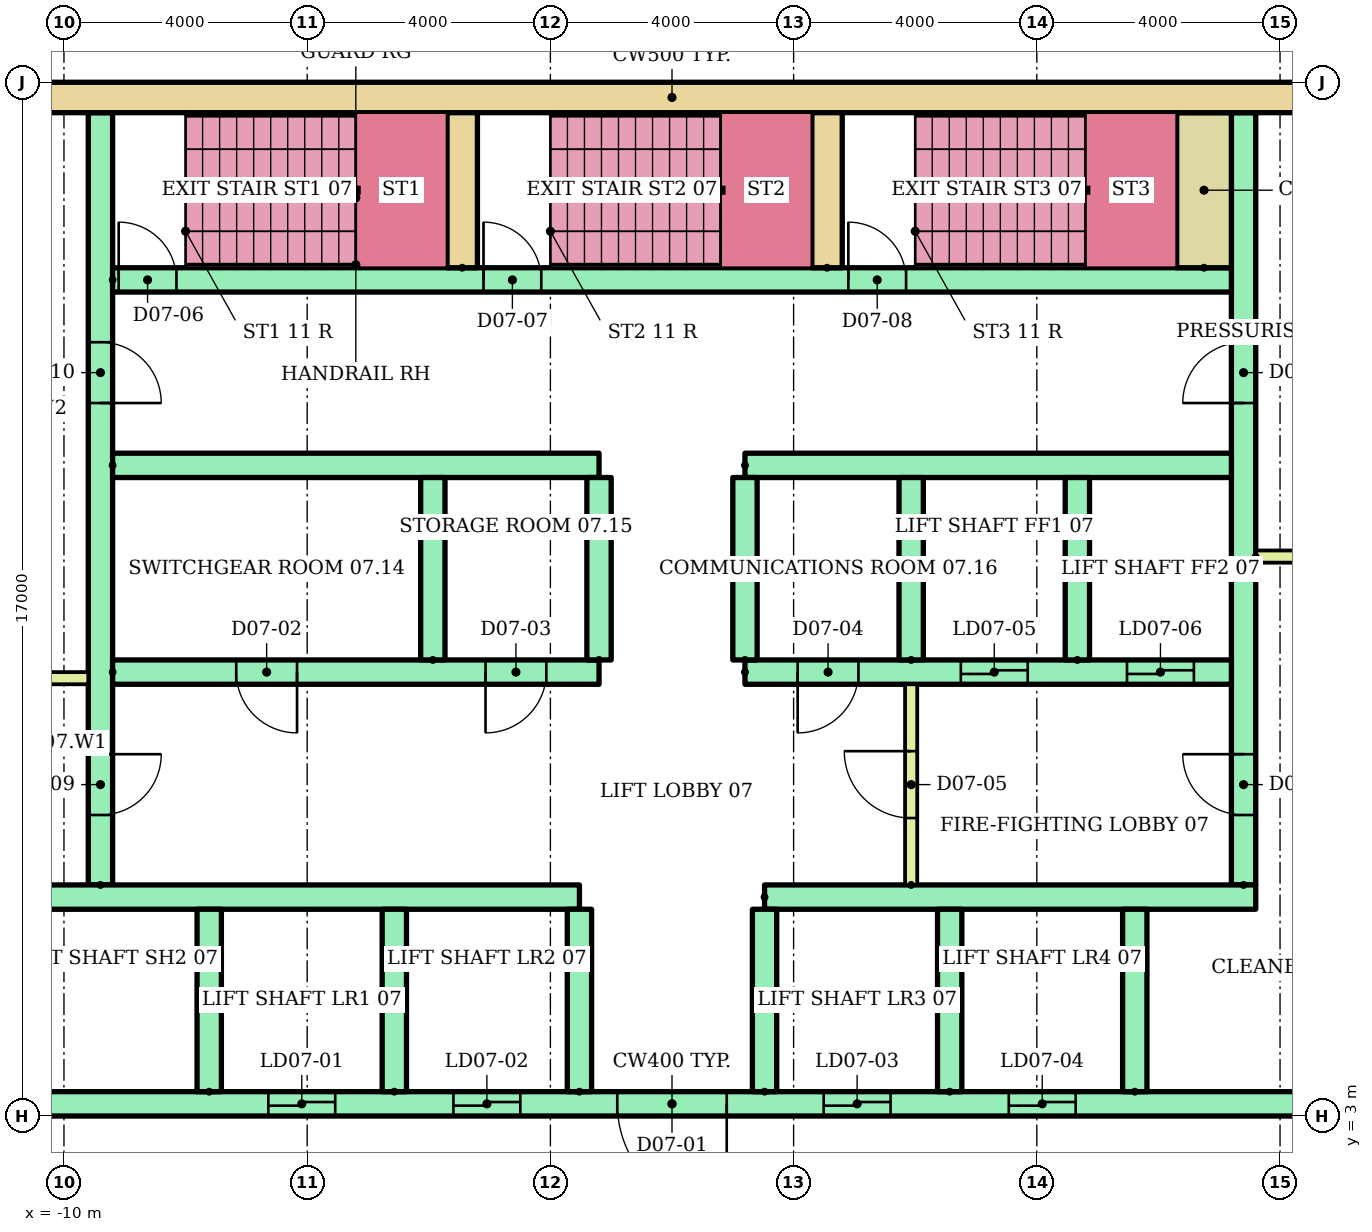
"""IFC4 building model, lengths in metres.
Left out: names, types, materials, properties, quantities, classifications, styles, units other than length and angle.
Written with IfcOpenShell. Run it as: python <this file> out.ifc"""

import sys

from ifc_helpers import new_model, si_unit, direction, frame, frame_2d, origin, place, context, subcontext, project, spatial, rectangle, extrude, element, fill, save


model = new_model("IFC4")
c1 = context("Model", 3, precision=1e-05, world=origin(), true_north=direction((0.0, 1.0)))
c2 = subcontext(c1, "Body", "Model", "MODEL_VIEW")
j1 = project(units=[si_unit("LENGTHUNIT", "METRE"), si_unit("PLANEANGLEUNIT", "RADIAN")], contexts=[c1])
p1 = place(None, origin())
s1 = spatial("IfcSite", under=j1, at=p1, CompositionType="ELEMENT")
p2 = place(p1, origin())
s2 = spatial("IfcBuilding", under=s1, at=p2, CompositionType="ELEMENT")
p3 = place(p2, frame((0.0, 0.0, 29.9)))
s3 = spatial("IfcBuildingStorey", under=s2, at=p3, CompositionType="ELEMENT", Elevation=29.9)
p4 = place(p3, frame((-13.5, 19.75, 0.0)))
e1 = element("IfcWall", 1, at=p4, inside=s3, PredefinedType="SHEAR", context=c2, shape_type="SweptSolid", body=[
    extrude(rectangle(XDim=27.0, YDim=0.5, at=frame_2d((13.5, 0.0))), origin(), (0.0, 0.0, 1.0), 3.6),
])
p5 = place(p3, frame((-9.4, 6.8, 0.0), z_axis=(0.0, 0.0, 1.0), x_axis=(0.0, 1.0, 0.0)))
e2 = element("IfcWall", 2, at=p5, inside=s3, PredefinedType="SHEAR", context=c2, shape_type="SweptSolid", body=[
    extrude(rectangle(XDim=12.7, YDim=0.4, at=frame_2d((6.35, 0.0))), origin(), (0.0, 0.0, 1.0), 3.6),
])
p6 = place(p5, frame((1.15, 0.0, 0.0)))
e3 = element("IfcOpeningElement", 3, at=p6, cuts=e2, PredefinedType="OPENING", context=c2, shape_type="SweptSolid", body=[
    extrude(rectangle(XDim=1.0, YDim=2.1, at=frame_2d((0.5, 1.05))), frame((0.0, 0.21, 0.0), z_axis=(0.0, -1.0, 0.0), x_axis=(1.0, 0.0, 0.0)), (0.0, 0.0, 1.0), 0.42),
])
p7 = place(p5, frame((7.925, 0.0, 0.0)))
e4 = element("IfcOpeningElement", 4, at=p7, cuts=e2, PredefinedType="OPENING", context=c2, shape_type="SweptSolid", body=[
    extrude(rectangle(XDim=1.0, YDim=2.1, at=frame_2d((0.5, 1.05))), frame((0.0, 0.21, 0.0), z_axis=(0.0, -1.0, 0.0), x_axis=(1.0, 0.0, 0.0)), (0.0, 0.0, 1.0), 0.42),
])
p8 = place(p3, frame((9.4, 6.8, 0.0), z_axis=(0.0, 0.0, 1.0), x_axis=(0.0, 1.0, 0.0)))
e5 = element("IfcWall", 5, at=p8, inside=s3, PredefinedType="SHEAR", context=c2, shape_type="SweptSolid", body=[
    extrude(rectangle(XDim=12.7, YDim=0.4, at=frame_2d((6.35, 0.0))), origin(), (0.0, 0.0, 1.0), 3.6),
])
p9 = place(p8, frame((1.15, 0.0, 0.0)))
e6 = element("IfcOpeningElement", 6, at=p9, cuts=e5, PredefinedType="OPENING", context=c2, shape_type="SweptSolid", body=[
    extrude(rectangle(XDim=1.0, YDim=2.1, at=frame_2d((0.5, 1.05))), frame((0.0, 0.21, 0.0), z_axis=(0.0, -1.0, 0.0), x_axis=(1.0, 0.0, 0.0)), (0.0, 0.0, 1.0), 0.42),
])
p10 = place(p8, frame((7.925, 0.0, 0.0)))
e7 = element("IfcOpeningElement", 7, at=p10, cuts=e5, PredefinedType="OPENING", context=c2, shape_type="SweptSolid", body=[
    extrude(rectangle(XDim=1.0, YDim=2.1, at=frame_2d((0.5, 1.05))), frame((0.0, 0.21, 0.0), z_axis=(0.0, -1.0, 0.0), x_axis=(1.0, 0.0, 0.0)), (0.0, 0.0, 1.0), 0.42),
])
p11 = place(p3, frame((-13.5, 3.2, 0.0)))
e8 = element("IfcWall", 8, at=p11, inside=s3, PredefinedType="SHEAR", context=c2, shape_type="SweptSolid", body=[
    extrude(rectangle(XDim=27.0, YDim=0.4, at=frame_2d((13.5, 0.0))), origin(), (0.0, 0.0, 1.0), 3.6),
])
p12 = place(p11, frame((6.861, 0.0, 0.0)))
e9 = element("IfcOpeningElement", 9, at=p12, cuts=e8, PredefinedType="OPENING", context=c2, shape_type="SweptSolid", body=[
    extrude(rectangle(XDim=1.1, YDim=2.1, at=frame_2d((0.55, 1.05))), frame((0.0, 0.21, 0.0), z_axis=(0.0, -1.0, 0.0), x_axis=(1.0, 0.0, 0.0)), (0.0, 0.0, 1.0), 0.42),
])
p13 = place(p11, frame((9.906, 0.0, 0.0)))
e10 = element("IfcOpeningElement", 10, at=p13, cuts=e8, PredefinedType="OPENING", context=c2, shape_type="SweptSolid", body=[
    extrude(rectangle(XDim=1.1, YDim=2.1, at=frame_2d((0.55, 1.05))), frame((0.0, 0.21, 0.0), z_axis=(0.0, -1.0, 0.0), x_axis=(1.0, 0.0, 0.0)), (0.0, 0.0, 1.0), 0.42),
])
p14 = place(p11, frame((15.994, 0.0, 0.0)))
e11 = element("IfcOpeningElement", 11, at=p14, cuts=e8, PredefinedType="OPENING", context=c2, shape_type="SweptSolid", body=[
    extrude(rectangle(XDim=1.1, YDim=2.1, at=frame_2d((0.55, 1.05))), frame((0.0, 0.21, 0.0), z_axis=(0.0, -1.0, 0.0), x_axis=(1.0, 0.0, 0.0)), (0.0, 0.0, 1.0), 0.42),
])
p15 = place(p11, frame((19.039, 0.0, 0.0)))
e12 = element("IfcOpeningElement", 12, at=p15, cuts=e8, PredefinedType="OPENING", context=c2, shape_type="SweptSolid", body=[
    extrude(rectangle(XDim=1.1, YDim=2.1, at=frame_2d((0.55, 1.05))), frame((0.0, 0.21, 0.0), z_axis=(0.0, -1.0, 0.0), x_axis=(1.0, 0.0, 0.0)), (0.0, 0.0, 1.0), 0.42),
])
p16 = place(p11, frame((12.6, 0.0, 0.0)))
e13 = element("IfcOpeningElement", 13, at=p16, cuts=e8, PredefinedType="OPENING", context=c2, shape_type="SweptSolid", body=[
    extrude(rectangle(XDim=1.8, YDim=2.1, at=frame_2d((0.9, 1.05))), frame((0.0, 0.21, 0.0), z_axis=(0.0, -1.0, 0.0), x_axis=(1.0, 0.0, 0.0)), (0.0, 0.0, 1.0), 0.42),
])
p17 = place(p3, frame((-13.5, 6.6, 0.0)))
e14 = element("IfcWall", 14, at=p17, inside=s3, PredefinedType="SHEAR", context=c2, shape_type="SweptSolid", body=[
    extrude(rectangle(XDim=11.978, YDim=0.4, at=frame_2d((5.989, 0.0))), origin(), (0.0, 0.0, 1.0), 3.6),
])
p18 = place(p3, frame((1.522, 6.6, 0.0)))
e15 = element("IfcWall", 15, at=p18, inside=s3, PredefinedType="SHEAR", context=c2, shape_type="SweptSolid", body=[
    extrude(rectangle(XDim=8.078, YDim=0.4, at=frame_2d((4.039, 0.0))), origin(), (0.0, 0.0, 1.0), 3.6),
])
for number, where, z_axis, x_axis in (
    (16, (-7.611, 3.4, 0.0), (0.0, 0.0, 1.0), (0.0, 1.0, 0.0)),
    (17, (-4.567, 3.4, 0.0), (0.0, 0.0, 1.0), (0.0, 1.0, 0.0)),
    (18, (-1.522, 3.4, 0.0), (0.0, 0.0, 1.0), (0.0, 1.0, 0.0)),
    (19, (1.522, 3.4, 0.0), (0.0, 0.0, 1.0), (0.0, 1.0, 0.0)),
    (20, (4.567, 3.4, 0.0), (0.0, 0.0, 1.0), (0.0, 1.0, 0.0)),
    (21, (7.611, 3.4, 0.0), (0.0, 0.0, 1.0), (0.0, 1.0, 0.0)),
):
    element("IfcWall", number, at=place(p3, frame(where, z_axis=z_axis, x_axis=x_axis)), inside=s3, PredefinedType="SHEAR", context=c2, shape_type="SweptSolid", body=[
        extrude(rectangle(XDim=3.0, YDim=0.4, at=frame_2d((1.5, 0.0))), origin(), (0.0, 0.0, 1.0), 3.6),
    ])
p19 = place(p3, frame((-9.2, 10.3, 0.0)))
e22 = element("IfcWall", 22, at=p19, inside=s3, PredefinedType="SHEAR", context=c2, shape_type="SweptSolid", body=[
    extrude(rectangle(XDim=8.0, YDim=0.4, at=frame_2d((4.0, 0.0))), origin(), (0.0, 0.0, 1.0), 3.6),
])
p20 = place(p19, frame((2.033, 0.0, 0.0)))
e23 = element("IfcOpeningElement", 23, at=p20, cuts=e22, PredefinedType="OPENING", context=c2, shape_type="SweptSolid", body=[
    extrude(rectangle(XDim=1.0, YDim=2.1, at=frame_2d((0.5, 1.05))), frame((0.0, 0.21, 0.0), z_axis=(0.0, -1.0, 0.0), x_axis=(1.0, 0.0, 0.0)), (0.0, 0.0, 1.0), 0.42),
])
p21 = place(p19, frame((6.133, 0.0, 0.0)))
e24 = element("IfcOpeningElement", 24, at=p21, cuts=e22, PredefinedType="OPENING", context=c2, shape_type="SweptSolid", body=[
    extrude(rectangle(XDim=1.0, YDim=2.1, at=frame_2d((0.5, 1.05))), frame((0.0, 0.21, 0.0), z_axis=(0.0, -1.0, 0.0), x_axis=(1.0, 0.0, 0.0)), (0.0, 0.0, 1.0), 0.42),
])
p22 = place(p3, frame((-9.2, 13.7, 0.0)))
e25 = element("IfcWall", 25, at=p22, inside=s3, PredefinedType="SHEAR", context=c2, shape_type="SweptSolid", body=[
    extrude(rectangle(XDim=8.0, YDim=0.4, at=frame_2d((4.0, 0.0))), origin(), (0.0, 0.0, 1.0), 3.6),
])
p23 = place(p3, frame((1.2, 10.3, 0.0)))
e26 = element("IfcWall", 26, at=p23, inside=s3, PredefinedType="SHEAR", context=c2, shape_type="SweptSolid", body=[
    extrude(rectangle(XDim=8.0, YDim=0.4, at=frame_2d((4.0, 0.0))), origin(), (0.0, 0.0, 1.0), 3.6),
])
p24 = place(p23, frame((3.55, 0.0, 0.0)))
e27 = element("IfcOpeningElement", 27, at=p24, cuts=e26, PredefinedType="OPENING", context=c2, shape_type="SweptSolid", body=[
    extrude(rectangle(XDim=1.1, YDim=2.1, at=frame_2d((0.55, 1.05))), frame((0.0, 0.21, 0.0), z_axis=(0.0, -1.0, 0.0), x_axis=(1.0, 0.0, 0.0)), (0.0, 0.0, 1.0), 0.42),
])
p25 = place(p23, frame((6.283, 0.0, 0.0)))
e28 = element("IfcOpeningElement", 28, at=p25, cuts=e26, PredefinedType="OPENING", context=c2, shape_type="SweptSolid", body=[
    extrude(rectangle(XDim=1.1, YDim=2.1, at=frame_2d((0.55, 1.05))), frame((0.0, 0.21, 0.0), z_axis=(0.0, -1.0, 0.0), x_axis=(1.0, 0.0, 0.0)), (0.0, 0.0, 1.0), 0.42),
])
p26 = place(p23, frame((0.867, 0.0, 0.0)))
e29 = element("IfcOpeningElement", 29, at=p26, cuts=e26, PredefinedType="OPENING", context=c2, shape_type="SweptSolid", body=[
    extrude(rectangle(XDim=1.0, YDim=2.1, at=frame_2d((0.5, 1.05))), frame((0.0, 0.21, 0.0), z_axis=(0.0, -1.0, 0.0), x_axis=(1.0, 0.0, 0.0)), (0.0, 0.0, 1.0), 0.42),
])
p27 = place(p3, frame((1.2, 13.7, 0.0)))
e30 = element("IfcWall", 30, at=p27, inside=s3, PredefinedType="SHEAR", context=c2, shape_type="SweptSolid", body=[
    extrude(rectangle(XDim=8.0, YDim=0.4, at=frame_2d((4.0, 0.0))), origin(), (0.0, 0.0, 1.0), 3.6),
])
for number, where, z_axis, x_axis in (
    (31, (-3.933, 10.5, 0.0), (0.0, 0.0, 1.0), (0.0, 1.0, 0.0)),
    (32, (-1.2, 10.5, 0.0), (0.0, 0.0, 1.0), (0.0, 1.0, 0.0)),
    (33, (1.2, 10.5, 0.0), (0.0, 0.0, 1.0), (0.0, 1.0, 0.0)),
    (34, (3.933, 10.5, 0.0), (0.0, 0.0, 1.0), (0.0, 1.0, 0.0)),
    (35, (6.667, 10.5, 0.0), (0.0, 0.0, 1.0), (0.0, 1.0, 0.0)),
):
    element("IfcWall", number, at=place(p3, frame(where, z_axis=z_axis, x_axis=x_axis)), inside=s3, PredefinedType="SHEAR", context=c2, shape_type="SweptSolid", body=[
        extrude(rectangle(XDim=3.0, YDim=0.4, at=frame_2d((1.5, 0.0))), origin(), (0.0, 0.0, 1.0), 3.6),
    ])
p28 = place(p3, frame((3.933, 6.8, 0.0), z_axis=(0.0, 0.0, 1.0), x_axis=(0.0, 1.0, 0.0)))
e36 = element("IfcWall", 36, at=p28, inside=s3, PredefinedType="PARTITIONING", context=c2, shape_type="SweptSolid", body=[
    extrude(rectangle(XDim=3.3, YDim=0.2, at=frame_2d((1.65, 0.0))), origin(), (0.0, 0.0, 1.0), 3.6),
])
p29 = place(p28, frame((1.1, 0.0, 0.0)))
e37 = element("IfcOpeningElement", 37, at=p29, cuts=e36, PredefinedType="OPENING", context=c2, shape_type="SweptSolid", body=[
    extrude(rectangle(XDim=1.1, YDim=2.1, at=frame_2d((0.55, 1.05))), frame((0.0, 0.11, 0.0), z_axis=(0.0, -1.0, 0.0), x_axis=(1.0, 0.0, 0.0)), (0.0, 0.0, 1.0), 0.22),
])
p30 = place(p3, frame((-9.2, 16.75, 0.0)))
e38 = element("IfcWall", 38, at=p30, inside=s3, PredefinedType="SHEAR", context=c2, shape_type="SweptSolid", body=[
    extrude(rectangle(XDim=18.4, YDim=0.4, at=frame_2d((9.2, 0.0))), origin(), (0.0, 0.0, 1.0), 3.6),
])
p31 = place(p30, frame((0.1, 0.0, 0.0)))
e39 = element("IfcOpeningElement", 39, at=p31, cuts=e38, PredefinedType="OPENING", context=c2, shape_type="SweptSolid", body=[
    extrude(rectangle(XDim=0.95, YDim=2.1, at=frame_2d((0.475, 1.05))), frame((0.0, 0.21, 0.0), z_axis=(0.0, -1.0, 0.0), x_axis=(1.0, 0.0, 0.0)), (0.0, 0.0, 1.0), 0.42),
])
p32 = place(p30, frame((6.1, 0.0, 0.0)))
e40 = element("IfcOpeningElement", 40, at=p32, cuts=e38, PredefinedType="OPENING", context=c2, shape_type="SweptSolid", body=[
    extrude(rectangle(XDim=0.95, YDim=2.1, at=frame_2d((0.475, 1.05))), frame((0.0, 0.21, 0.0), z_axis=(0.0, -1.0, 0.0), x_axis=(1.0, 0.0, 0.0)), (0.0, 0.0, 1.0), 0.42),
])
p33 = place(p30, frame((12.1, 0.0, 0.0)))
e41 = element("IfcOpeningElement", 41, at=p33, cuts=e38, PredefinedType="OPENING", context=c2, shape_type="SweptSolid", body=[
    extrude(rectangle(XDim=0.95, YDim=2.1, at=frame_2d((0.475, 1.05))), frame((0.0, 0.21, 0.0), z_axis=(0.0, -1.0, 0.0), x_axis=(1.0, 0.0, 0.0)), (0.0, 0.0, 1.0), 0.42),
])
for number, where, z_axis, x_axis in (
    (42, (-3.45, 16.95, 0.0), (0.0, 0.0, 1.0), (0.0, 1.0, 0.0)),
    (43, (2.55, 16.95, 0.0), (0.0, 0.0, 1.0), (0.0, 1.0, 0.0)),
):
    element("IfcWall", number, at=place(p3, frame(where, z_axis=z_axis, x_axis=x_axis)), inside=s3, PredefinedType="SHEAR", context=c2, shape_type="SweptSolid", body=[
        extrude(rectangle(XDim=2.55, YDim=0.5, at=frame_2d((1.275, 0.0))), origin(), (0.0, 0.0, 1.0), 3.6),
    ])
p34 = place(p3, frame((8.75, 16.95, 0.0), z_axis=(0.0, 0.0, 1.0), x_axis=(0.0, 1.0, 0.0)))
e44 = element("IfcWall", 44, at=p34, inside=s3, PredefinedType="SHEAR", context=c2, shape_type="SweptSolid", body=[
    extrude(rectangle(XDim=2.55, YDim=0.9, at=frame_2d((1.275, 0.0))), origin(), (0.0, 0.0, 1.0), 3.6),
])
for number, where in (
    (45, (-13.5, 10.2, 0.0)),
    (46, (9.6, 12.2, 0.0)),
):
    element("IfcWall", number, at=place(p3, frame(where)), inside=s3, PredefinedType="PARTITIONING", context=c2, shape_type="SweptSolid", body=[
        extrude(rectangle(XDim=3.9, YDim=0.2, at=frame_2d((1.95, 0.0))), origin(), (0.0, 0.0, 1.0), 3.6),
    ])
p35 = place(p12, origin())
e47 = element("IfcDoor", 47, at=p35, inside=s3, OperationType="SLIDING_TO_LEFT", PredefinedType="DOOR", context=c2, shape_type="SweptSolid", body=[
    extrude(rectangle(XDim=1.1, YDim=2.1, at=frame_2d((0.55, 1.05))), frame((0.0, 0.025, 0.0), z_axis=(0.0, -1.0, 0.0), x_axis=(1.0, 0.0, 0.0)), (0.0, 0.0, 1.0), 0.05),
])
fill(e9, e47)
p36 = place(p13, origin())
e48 = element("IfcDoor", 48, at=p36, inside=s3, OperationType="SLIDING_TO_LEFT", PredefinedType="DOOR", context=c2, shape_type="SweptSolid", body=[
    extrude(rectangle(XDim=1.1, YDim=2.1, at=frame_2d((0.55, 1.05))), frame((0.0, 0.025, 0.0), z_axis=(0.0, -1.0, 0.0), x_axis=(1.0, 0.0, 0.0)), (0.0, 0.0, 1.0), 0.05),
])
fill(e10, e48)
p37 = place(p14, origin())
e49 = element("IfcDoor", 49, at=p37, inside=s3, OperationType="SLIDING_TO_LEFT", PredefinedType="DOOR", context=c2, shape_type="SweptSolid", body=[
    extrude(rectangle(XDim=1.1, YDim=2.1, at=frame_2d((0.55, 1.05))), frame((0.0, 0.025, 0.0), z_axis=(0.0, -1.0, 0.0), x_axis=(1.0, 0.0, 0.0)), (0.0, 0.0, 1.0), 0.05),
])
fill(e11, e49)
p38 = place(p15, origin())
e50 = element("IfcDoor", 50, at=p38, inside=s3, OperationType="SLIDING_TO_LEFT", PredefinedType="DOOR", context=c2, shape_type="SweptSolid", body=[
    extrude(rectangle(XDim=1.1, YDim=2.1, at=frame_2d((0.55, 1.05))), frame((0.0, 0.025, 0.0), z_axis=(0.0, -1.0, 0.0), x_axis=(1.0, 0.0, 0.0)), (0.0, 0.0, 1.0), 0.05),
])
fill(e12, e50)
p39 = place(p16, frame((1.8, 0.0, 0.0), z_axis=(0.0, 0.0, 1.0), x_axis=(-1.0, 0.0, 0.0)))
e51 = element("IfcDoor", 51, at=p39, inside=s3, OperationType="DOUBLE_DOOR_SINGLE_SWING", PredefinedType="DOOR", context=c2, shape_type="SweptSolid", body=[
    extrude(rectangle(XDim=1.8, YDim=2.1, at=frame_2d((0.9, 1.05))), frame((0.0, 0.025, 0.0), z_axis=(0.0, -1.0, 0.0), x_axis=(1.0, 0.0, 0.0)), (0.0, 0.0, 1.0), 0.05),
])
fill(e13, e51)
p40 = place(p24, origin())
e52 = element("IfcDoor", 52, at=p40, inside=s3, OperationType="SLIDING_TO_LEFT", PredefinedType="DOOR", context=c2, shape_type="SweptSolid", body=[
    extrude(rectangle(XDim=1.1, YDim=2.1, at=frame_2d((0.55, 1.05))), frame((0.0, 0.025, 0.0), z_axis=(0.0, -1.0, 0.0), x_axis=(1.0, 0.0, 0.0)), (0.0, 0.0, 1.0), 0.05),
])
fill(e27, e52)
p41 = place(p25, origin())
e53 = element("IfcDoor", 53, at=p41, inside=s3, OperationType="SLIDING_TO_LEFT", PredefinedType="DOOR", context=c2, shape_type="SweptSolid", body=[
    extrude(rectangle(XDim=1.1, YDim=2.1, at=frame_2d((0.55, 1.05))), frame((0.0, 0.025, 0.0), z_axis=(0.0, -1.0, 0.0), x_axis=(1.0, 0.0, 0.0)), (0.0, 0.0, 1.0), 0.05),
])
fill(e28, e53)
p42 = place(p20, frame((1.0, 0.0, 0.0), z_axis=(0.0, 0.0, 1.0), x_axis=(-1.0, 0.0, 0.0)))
e54 = element("IfcDoor", 54, at=p42, inside=s3, OperationType="SINGLE_SWING_RIGHT", PredefinedType="DOOR", context=c2, shape_type="SweptSolid", body=[
    extrude(rectangle(XDim=1.0, YDim=2.1, at=frame_2d((0.5, 1.05))), frame((0.0, 0.025, 0.0), z_axis=(0.0, -1.0, 0.0), x_axis=(1.0, 0.0, 0.0)), (0.0, 0.0, 1.0), 0.05),
])
fill(e23, e54)
p43 = place(p21, frame((1.0, 0.0, 0.0), z_axis=(0.0, 0.0, 1.0), x_axis=(-1.0, 0.0, 0.0)))
e55 = element("IfcDoor", 55, at=p43, inside=s3, OperationType="SINGLE_SWING_LEFT", PredefinedType="DOOR", context=c2, shape_type="SweptSolid", body=[
    extrude(rectangle(XDim=1.0, YDim=2.1, at=frame_2d((0.5, 1.05))), frame((0.0, 0.025, 0.0), z_axis=(0.0, -1.0, 0.0), x_axis=(1.0, 0.0, 0.0)), (0.0, 0.0, 1.0), 0.05),
])
fill(e24, e55)
p44 = place(p26, frame((1.0, 0.0, 0.0), z_axis=(0.0, 0.0, 1.0), x_axis=(-1.0, 0.0, 0.0)))
e56 = element("IfcDoor", 56, at=p44, inside=s3, OperationType="SINGLE_SWING_LEFT", PredefinedType="DOOR", context=c2, shape_type="SweptSolid", body=[
    extrude(rectangle(XDim=1.0, YDim=2.1, at=frame_2d((0.5, 1.05))), frame((0.0, 0.025, 0.0), z_axis=(0.0, -1.0, 0.0), x_axis=(1.0, 0.0, 0.0)), (0.0, 0.0, 1.0), 0.05),
])
fill(e29, e56)
p45 = place(p29, origin())
e57 = element("IfcDoor", 57, at=p45, inside=s3, OperationType="SINGLE_SWING_RIGHT", PredefinedType="DOOR", context=c2, shape_type="SweptSolid", body=[
    extrude(rectangle(XDim=1.1, YDim=2.1, at=frame_2d((0.55, 1.05))), frame((0.0, 0.025, 0.0), z_axis=(0.0, -1.0, 0.0), x_axis=(1.0, 0.0, 0.0)), (0.0, 0.0, 1.0), 0.05),
])
fill(e37, e57)
p46 = place(p31, origin())
e58 = element("IfcDoor", 58, at=p46, inside=s3, OperationType="SINGLE_SWING_LEFT", PredefinedType="DOOR", context=c2, shape_type="SweptSolid", body=[
    extrude(rectangle(XDim=0.95, YDim=2.1, at=frame_2d((0.475, 1.05))), frame((0.0, 0.025, 0.0), z_axis=(0.0, -1.0, 0.0), x_axis=(1.0, 0.0, 0.0)), (0.0, 0.0, 1.0), 0.05),
])
fill(e39, e58)
p47 = place(p32, origin())
e59 = element("IfcDoor", 59, at=p47, inside=s3, OperationType="SINGLE_SWING_LEFT", PredefinedType="DOOR", context=c2, shape_type="SweptSolid", body=[
    extrude(rectangle(XDim=0.95, YDim=2.1, at=frame_2d((0.475, 1.05))), frame((0.0, 0.025, 0.0), z_axis=(0.0, -1.0, 0.0), x_axis=(1.0, 0.0, 0.0)), (0.0, 0.0, 1.0), 0.05),
])
fill(e40, e59)
p48 = place(p33, origin())
e60 = element("IfcDoor", 60, at=p48, inside=s3, OperationType="SINGLE_SWING_LEFT", PredefinedType="DOOR", context=c2, shape_type="SweptSolid", body=[
    extrude(rectangle(XDim=0.95, YDim=2.1, at=frame_2d((0.475, 1.05))), frame((0.0, 0.025, 0.0), z_axis=(0.0, -1.0, 0.0), x_axis=(1.0, 0.0, 0.0)), (0.0, 0.0, 1.0), 0.05),
])
fill(e41, e60)
p49 = place(p6, frame((1.0, 0.0, 0.0), z_axis=(0.0, 0.0, 1.0), x_axis=(-1.0, 0.0, 0.0)))
e61 = element("IfcDoor", 61, at=p49, inside=s3, OperationType="SINGLE_SWING_RIGHT", PredefinedType="DOOR", context=c2, shape_type="SweptSolid", body=[
    extrude(rectangle(XDim=1.0, YDim=2.1, at=frame_2d((0.5, 1.05))), frame((0.0, 0.025, 0.0), z_axis=(0.0, -1.0, 0.0), x_axis=(1.0, 0.0, 0.0)), (0.0, 0.0, 1.0), 0.05),
])
fill(e3, e61)
p50 = place(p7, frame((1.0, 0.0, 0.0), z_axis=(0.0, 0.0, 1.0), x_axis=(-1.0, 0.0, 0.0)))
e62 = element("IfcDoor", 62, at=p50, inside=s3, OperationType="SINGLE_SWING_LEFT", PredefinedType="DOOR", context=c2, shape_type="SweptSolid", body=[
    extrude(rectangle(XDim=1.0, YDim=2.1, at=frame_2d((0.5, 1.05))), frame((0.0, 0.025, 0.0), z_axis=(0.0, -1.0, 0.0), x_axis=(1.0, 0.0, 0.0)), (0.0, 0.0, 1.0), 0.05),
])
fill(e4, e62)
p51 = place(p9, origin())
e63 = element("IfcDoor", 63, at=p51, inside=s3, OperationType="SINGLE_SWING_RIGHT", PredefinedType="DOOR", context=c2, shape_type="SweptSolid", body=[
    extrude(rectangle(XDim=1.0, YDim=2.1, at=frame_2d((0.5, 1.05))), frame((0.0, 0.025, 0.0), z_axis=(0.0, -1.0, 0.0), x_axis=(1.0, 0.0, 0.0)), (0.0, 0.0, 1.0), 0.05),
])
fill(e6, e63)
p52 = place(p10, origin())
e64 = element("IfcDoor", 64, at=p52, inside=s3, OperationType="SINGLE_SWING_LEFT", PredefinedType="DOOR", context=c2, shape_type="SweptSolid", body=[
    extrude(rectangle(XDim=1.0, YDim=2.1, at=frame_2d((0.5, 1.05))), frame((0.0, 0.025, 0.0), z_axis=(0.0, -1.0, 0.0), x_axis=(1.0, 0.0, 0.0)), (0.0, 0.0, 1.0), 0.05),
])
fill(e7, e64)
save(model, sys.argv[1])
